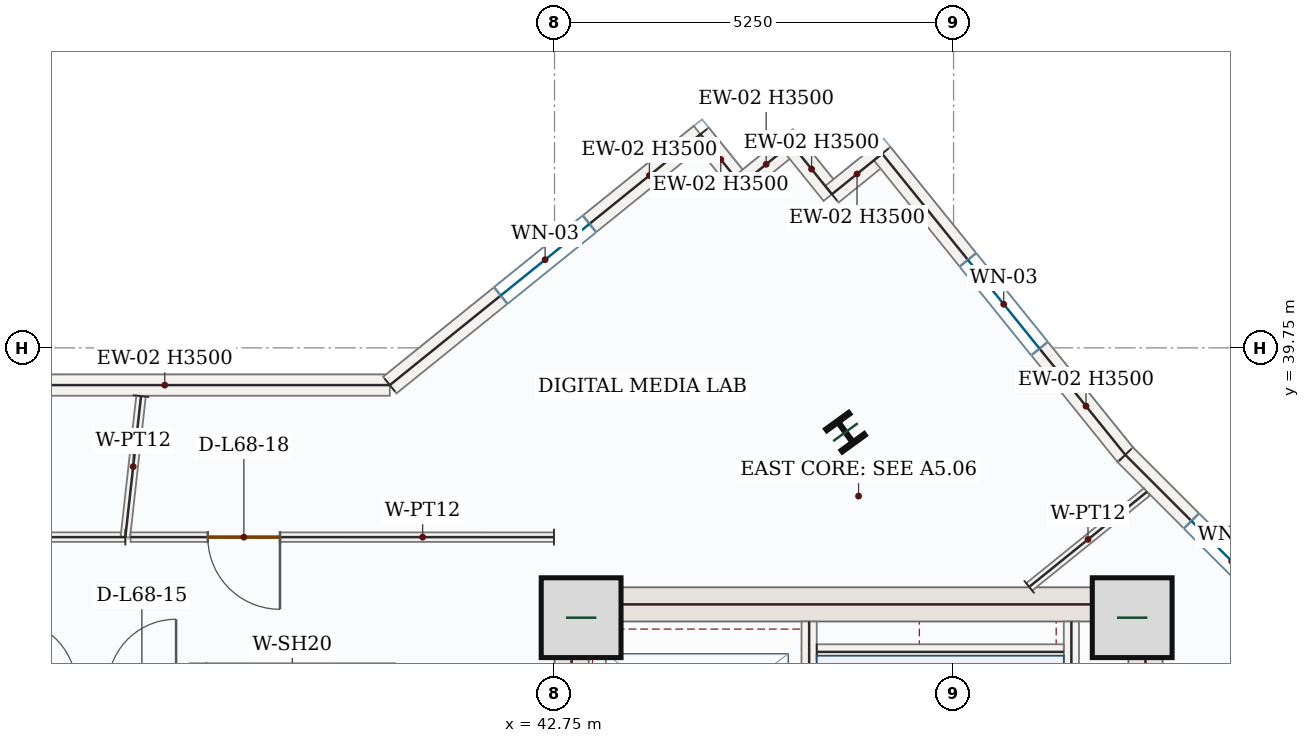
"""IFC4 building model, lengths in metres.
Left out: names, types, materials, properties, quantities, classifications, styles, units other than length and angle.
Written with IfcOpenShell. Run it as: python <this file> out.ifc"""

import sys

from ifc_helpers import new_model, si_unit, direction, frame, frame_2d, origin, origin_2d, place, context, subcontext, project, spatial, rectangle, i_section, extrude, source, transform, mapped, element, fill, save


model = new_model("IFC4")
c1 = context("Model", 3, precision=1e-05, world=origin(), true_north=direction((0.0, 1.0)))
c2 = subcontext(c1, "Body", "Model", "MODEL_VIEW")
j1 = project(units=[si_unit("LENGTHUNIT", "METRE"), si_unit("PLANEANGLEUNIT", "RADIAN")], contexts=[c1])
p1 = place(None, origin())
s1 = spatial("IfcSite", under=j1, at=p1, CompositionType="ELEMENT")
p2 = place(p1, origin())
s2 = spatial("IfcBuilding", under=s1, at=p2, CompositionType="ELEMENT")
p3 = place(p2, frame((0.0, 0.0, 284.1)))
s3 = spatial("IfcBuildingStorey", under=s2, at=p3, CompositionType="ELEMENT", Elevation=284.1)
p4 = place(p3, frame((42.975, 28.05, 0.0), z_axis=(0.0, 0.0, 1.0), x_axis=(0.0, 1.0, 0.0)))
e1 = element("IfcWall", 1, at=p4, inside=s3, PredefinedType="SHEAR", context=c2, shape_type="SweptSolid", body=[
    extrude(rectangle(XDim=8.55, YDim=0.45, at=frame_2d((4.275, 0.0))), origin(), (0.0, 0.0, 1.0), 3.5),
])
p5 = place(p4, frame((1.5, 0.0, 0.0)))
e2 = element("IfcOpeningElement", 2, at=p5, cuts=e1, PredefinedType="OPENING", context=c2, shape_type="SweptSolid", body=[
    extrude(rectangle(XDim=1.1, YDim=2.2, at=frame_2d((0.55, 1.1))), frame((0.0, 0.235, 0.0), z_axis=(0.0, -1.0, 0.0), x_axis=(1.0, 0.0, 0.0)), (0.0, 0.0, 1.0), 0.47),
])
m1 = source(origin(), c2, "Body", "SweptSolid", [
    extrude(rectangle(XDim=8.55, YDim=0.45, at=frame_2d((4.275, 0.0))), origin(), (0.0, 0.0, 1.0), 3.5),
])
p6 = place(p3, frame((50.525, 28.05, 0.0), z_axis=(0.0, 0.0, 1.0), x_axis=(0.0, 1.0, 0.0)))
e3 = element("IfcWall", 3, at=p6, inside=s3, PredefinedType="SHEAR", context=c2, shape_type="MappedRepresentation", body=[
    mapped(m1, transform((0.0, 0.0, 0.0), x_axis=(1.0, 0.0, 0.0), y_axis=(0.0, 1.0, 0.0), z_axis=(0.0, 0.0, 1.0), scale=1.0)),
])
m2 = source(origin(), c2, "Body", "SweptSolid", [
    extrude(rectangle(XDim=7.1, YDim=0.45, at=frame_2d((3.55, 0.0))), origin(), (0.0, 0.0, 1.0), 3.5),
])
p7 = place(p3, frame((43.2, 36.375, 0.0), z_axis=(0.0, 0.0, 1.0), x_axis=(1.0, 0.0, 0.0)))
e4 = element("IfcWall", 4, at=p7, inside=s3, PredefinedType="SHEAR", context=c2, shape_type="MappedRepresentation", body=[
    mapped(m2, transform((0.0, 0.0, 0.0), x_axis=(1.0, 0.0, 0.0), y_axis=(0.0, 1.0, 0.0), z_axis=(0.0, 0.0, 1.0), scale=1.0)),
])
m3 = source(origin(), c2, "Body", "SweptSolid", [
    extrude(rectangle(XDim=1.05, YDim=1.05, at=origin_2d()), origin(), (0.0, 0.0, 1.0), 3.75),
])
for number, where, z_axis, x_axis in (
    (5, (43.1, 36.2, 0.0), (0.0, 0.0, 1.0), (1.0, 0.0, 0.0)),
    (6, (50.35, 36.2, 0.0), (0.0, 0.0, 1.0), (1.0, 0.0, 0.0)),
):
    element("IfcColumn", number, at=place(p3, frame(where, z_axis=z_axis, x_axis=x_axis)), inside=s3, PredefinedType="COLUMN", context=c2, shape_type="MappedRepresentation", body=[
        mapped(m3, transform((0.0, 0.0, 0.0), x_axis=(1.0, 0.0, 0.0), y_axis=(0.0, 1.0, 0.0), z_axis=(0.0, 0.0, 1.0), scale=1.0)),
    ])
m4 = source(origin(), c2, "Body", "SweptSolid", [
    extrude(i_section(OverallWidth=0.374, OverallDepth=0.372, WebThickness=0.016, FlangeThickness=0.026, FilletRadius=0.018, at=origin_2d()), origin(), (0.0, 0.0, 1.0), 3.75),
])
p8 = place(p3, frame((46.578, 38.641, 0.0), z_axis=(0.0, 0.0, 1.0), x_axis=(0.809016994375, 0.587785252292, 0.0)))
e7 = element("IfcColumn", 7, at=p8, inside=s3, PredefinedType="COLUMN", context=c2, shape_type="MappedRepresentation", body=[
    mapped(m4, transform((0.0, 0.0, 0.0), x_axis=(1.0, 0.0, 0.0), y_axis=(0.0, 1.0, 0.0), z_axis=(0.0, 0.0, 1.0), scale=1.0)),
])
m5 = source(origin(), c2, "Body", "SweptSolid", [
    extrude(rectangle(XDim=5.922, YDim=0.28, at=frame_2d((2.961, 0.0))), origin(), (0.0, 0.0, 1.0), 3.5),
])
p9 = place(p3, frame((34.661, 39.26, 0.0), z_axis=(0.0, 0.0, 1.0), x_axis=(1.0, 0.0, 0.0)))
e8 = element("IfcWall", 8, at=p9, inside=s3, PredefinedType="SOLIDWALL", context=c2, shape_type="MappedRepresentation", body=[
    mapped(m5, transform((0.0, 0.0, 0.0), x_axis=(1.0, 0.0, 0.0), y_axis=(0.0, 1.0, 0.0), z_axis=(0.0, 0.0, 1.0), scale=1.0)),
])
p10 = place(p3, frame((40.583, 39.26, 0.0), z_axis=(0.0, 0.0, 1.0), x_axis=(0.778072238875, 0.628174809342, 0.0)))
e9 = element("IfcWall", 9, at=p10, inside=s3, PredefinedType="SOLIDWALL", context=c2, shape_type="SweptSolid", body=[
    extrude(rectangle(XDim=5.253, YDim=0.28, at=frame_2d((2.626, 0.0))), origin(), (0.0, 0.0, 1.0), 3.5),
])
p11 = place(p10, frame((1.876, 0.0, 0.85)))
e10 = element("IfcOpeningElement", 10, at=p11, cuts=e9, PredefinedType="OPENING", context=c2, shape_type="SweptSolid", body=[
    extrude(rectangle(XDim=1.5, YDim=1.5, at=frame_2d((0.75, 0.75))), frame((0.0, 0.15, 0.0), z_axis=(0.0, -1.0, 0.0), x_axis=(1.0, 0.0, 0.0)), (0.0, 0.0, 1.0), 0.3),
])
m6 = source(origin(), c2, "Body", "SweptSolid", [
    extrude(rectangle(XDim=0.85, YDim=0.28, at=frame_2d((0.425, 0.0))), origin(), (0.0, 0.0, 1.0), 3.5),
])
p12 = place(p3, frame((44.67, 42.56, 0.0), z_axis=(0.0, 0.0, 1.0), x_axis=(0.628156579423, -0.778086956405, 0.0)))
e11 = element("IfcWall", 11, at=p12, inside=s3, PredefinedType="SOLIDWALL", context=c2, shape_type="MappedRepresentation", body=[
    mapped(m6, transform((0.0, 0.0, 0.0), x_axis=(1.0, 0.0, 0.0), y_axis=(0.0, 1.0, 0.0), z_axis=(0.0, 0.0, 1.0), scale=1.0)),
])
m7 = source(origin(), c2, "Body", "SweptSolid", [
    extrude(rectangle(XDim=0.85, YDim=0.28, at=frame_2d((0.425, 0.0))), origin(), (0.0, 0.0, 1.0), 3.5),
])
p13 = place(p3, frame((45.204, 41.898, 0.0), z_axis=(0.0, 0.0, 1.0), x_axis=(0.777973585776, 0.628296983786, 0.0)))
e12 = element("IfcWall", 12, at=p13, inside=s3, PredefinedType="SOLIDWALL", context=c2, shape_type="MappedRepresentation", body=[
    mapped(m7, transform((0.0, 0.0, 0.0), x_axis=(1.0, 0.0, 0.0), y_axis=(0.0, 1.0, 0.0), z_axis=(0.0, 0.0, 1.0), scale=1.0)),
])
p14 = place(p3, frame((45.865, 42.432, 0.0), z_axis=(0.0, 0.0, 1.0), x_axis=(0.628330422687, -0.777946579095, 0.0)))
e13 = element("IfcWall", 13, at=p14, inside=s3, PredefinedType="SOLIDWALL", context=c2, shape_type="MappedRepresentation", body=[
    mapped(m6, transform((0.0, 0.0, 0.0), x_axis=(1.0, 0.0, 0.0), y_axis=(0.0, 1.0, 0.0), z_axis=(0.0, 0.0, 1.0), scale=1.0)),
])
p15 = place(p3, frame((46.399, 41.771, 0.0), z_axis=(0.0, 0.0, 1.0), x_axis=(0.777973585776, 0.628296983786, 0.0)))
e14 = element("IfcWall", 14, at=p15, inside=s3, PredefinedType="SOLIDWALL", context=c2, shape_type="MappedRepresentation", body=[
    mapped(m7, transform((0.0, 0.0, 0.0), x_axis=(1.0, 0.0, 0.0), y_axis=(0.0, 1.0, 0.0), z_axis=(0.0, 0.0, 1.0), scale=1.0)),
])
p16 = place(p3, frame((47.06, 42.305, 0.0), z_axis=(0.0, 0.0, 1.0), x_axis=(0.628225517447, -0.778031297075, 0.0)))
e15 = element("IfcWall", 15, at=p16, inside=s3, PredefinedType="SOLIDWALL", context=c2, shape_type="SweptSolid", body=[
    extrude(rectangle(XDim=5.093, YDim=0.28, at=frame_2d((2.546, 0.0))), origin(), (0.0, 0.0, 1.0), 3.5),
])
p17 = place(p16, frame((1.796, 0.0, 0.85)))
e16 = element("IfcOpeningElement", 16, at=p17, cuts=e15, PredefinedType="OPENING", context=c2, shape_type="SweptSolid", body=[
    extrude(rectangle(XDim=1.5, YDim=1.5, at=frame_2d((0.75, 0.75))), frame((0.0, 0.15, 0.0), z_axis=(0.0, -1.0, 0.0), x_axis=(1.0, 0.0, 0.0)), (0.0, 0.0, 1.0), 0.3),
])
p18 = place(p3, frame((50.26, 38.342, 0.0), z_axis=(0.0, 0.0, 1.0), x_axis=(0.707106781187, -0.707106781187, 0.0)))
e17 = element("IfcWall", 17, at=p18, inside=s3, PredefinedType="SOLIDWALL", context=c2, shape_type="SweptSolid", body=[
    extrude(rectangle(XDim=3.96, YDim=0.28, at=frame_2d((1.98, 0.0))), origin(), (0.0, 0.0, 1.0), 3.5),
])
p19 = place(p18, frame((1.23, 0.0, 0.85)))
e18 = element("IfcOpeningElement", 18, at=p19, cuts=e17, PredefinedType="OPENING", context=c2, shape_type="SweptSolid", body=[
    extrude(rectangle(XDim=1.5, YDim=1.5, at=frame_2d((0.75, 0.75))), frame((0.0, 0.15, 0.0), z_axis=(0.0, -1.0, 0.0), x_axis=(1.0, 0.0, 0.0)), (0.0, 0.0, 1.0), 0.3),
])
m8 = source(origin(), c2, "Body", "SweptSolid", [
    extrude(rectangle(XDim=7.87, YDim=0.2, at=frame_2d((3.935, 0.0))), origin(), (0.0, 0.0, 1.0), 3.5),
])
p20 = place(p3, frame((49.55, 28.28, 0.0), z_axis=(0.0, 0.0, 1.0), x_axis=(0.0, 1.0, 0.0)))
e19 = element("IfcWall", 19, at=p20, inside=s3, PredefinedType="SOLIDWALL", context=c2, shape_type="MappedRepresentation", body=[
    mapped(m8, transform((0.0, 0.0, 0.0), x_axis=(1.0, 0.0, 0.0), y_axis=(0.0, 1.0, 0.0), z_axis=(0.0, 0.0, 1.0), scale=1.0)),
])
p21 = place(p3, frame((46.1, 28.15, 0.0), z_axis=(0.0, 0.0, 1.0), x_axis=(0.0, 1.0, 0.0)))
e20 = element("IfcWall", 20, at=p21, inside=s3, PredefinedType="SOLIDWALL", context=c2, shape_type="SweptSolid", body=[
    extrude(rectangle(XDim=8.0, YDim=0.2, at=frame_2d((4.0, 0.0))), origin(), (0.0, 0.0, 1.0), 3.5),
])
p22 = place(p21, frame((0.4, 0.0, 0.0)))
e21 = element("IfcOpeningElement", 21, at=p22, cuts=e20, PredefinedType="OPENING", context=c2, shape_type="SweptSolid", body=[
    extrude(rectangle(XDim=1.05, YDim=2.15, at=frame_2d((0.525, 1.075))), frame((0.0, 0.11, 0.0), z_axis=(0.0, -1.0, 0.0), x_axis=(1.0, 0.0, 0.0)), (0.0, 0.0, 1.0), 0.22),
])
m9 = source(origin(), c2, "Body", "SweptSolid", [
    extrude(rectangle(XDim=3.25, YDim=0.2, at=frame_2d((1.625, 0.0))), origin(), (0.0, 0.0, 1.0), 3.5),
])
p23 = place(p3, frame((46.2, 35.75, 0.0), z_axis=(0.0, 0.0, 1.0), x_axis=(1.0, 0.0, 0.0)))
e22 = element("IfcWall", 22, at=p23, inside=s3, PredefinedType="SOLIDWALL", context=c2, shape_type="MappedRepresentation", body=[
    mapped(m9, transform((0.0, 0.0, 0.0), x_axis=(1.0, 0.0, 0.0), y_axis=(0.0, 1.0, 0.0), z_axis=(0.0, 0.0, 1.0), scale=1.0)),
])
m10 = source(origin(), c2, "Body", "SweptSolid", [
    extrude(rectangle(XDim=2.4, YDim=0.2, at=frame_2d((1.2, 0.0))), origin(), (0.0, 0.0, 1.0), 3.5),
])
p24 = place(p3, frame((38.05, 33.2, 0.0), z_axis=(0.0, 0.0, 1.0), x_axis=(0.0, 1.0, 0.0)))
e23 = element("IfcWall", 23, at=p24, inside=s3, PredefinedType="SOLIDWALL", context=c2, shape_type="MappedRepresentation", body=[
    mapped(m10, transform((0.0, 0.0, 0.0), x_axis=(1.0, 0.0, 0.0), y_axis=(0.0, 1.0, 0.0), z_axis=(0.0, 0.0, 1.0), scale=1.0)),
])
p25 = place(p3, frame((40.55, 33.2, 0.0), z_axis=(0.0, 0.0, 1.0), x_axis=(0.0, 1.0, 0.0)))
e24 = element("IfcWall", 24, at=p25, inside=s3, PredefinedType="SOLIDWALL", context=c2, shape_type="SweptSolid", body=[
    extrude(rectangle(XDim=2.4, YDim=0.2, at=frame_2d((1.2, 0.0))), origin(), (0.0, 0.0, 1.0), 3.5),
])
p26 = place(p25, frame((0.65, 0.0, 0.0)))
e25 = element("IfcOpeningElement", 25, at=p26, cuts=e24, PredefinedType="OPENING", context=c2, shape_type="SweptSolid", body=[
    extrude(rectangle(XDim=1.1, YDim=2.15, at=frame_2d((0.55, 1.075))), frame((0.0, 0.11, 0.0), z_axis=(0.0, -1.0, 0.0), x_axis=(1.0, 0.0, 0.0)), (0.0, 0.0, 1.0), 0.22),
])
m11 = source(origin(), c2, "Body", "SweptSolid", [
    extrude(rectangle(XDim=1.989, YDim=0.125, at=frame_2d((0.995, 0.0))), origin(), (0.0, 0.0, 1.0), 3.5),
])
p27 = place(p3, frame((48.995, 36.605, 0.0), z_axis=(0.0, 0.0, 1.0), x_axis=(0.778058853423, 0.628191388519, 0.0)))
e26 = element("IfcWall", 26, at=p27, inside=s3, PredefinedType="PARTITIONING", context=c2, shape_type="MappedRepresentation", body=[
    mapped(m11, transform((0.0, 0.0, 0.0), x_axis=(1.0, 0.0, 0.0), y_axis=(0.0, 1.0, 0.0), z_axis=(0.0, 0.0, 1.0), scale=1.0)),
])
p28 = place(p3, frame((37.104, 37.26, 0.0), z_axis=(0.0, 0.0, 1.0), x_axis=(-1.0, 0.0, 0.0)))
e27 = element("IfcWall", 27, at=p28, inside=s3, PredefinedType="PARTITIONING", context=c2, shape_type="SweptSolid", body=[
    extrude(rectangle(XDim=6.727, YDim=0.125, at=frame_2d((3.364, 0.0))), origin(), (0.0, 0.0, 1.0), 3.5),
])
p29 = place(p28, frame((1.271, 0.0, 0.0)))
e28 = element("IfcOpeningElement", 28, at=p29, cuts=e27, PredefinedType="OPENING", context=c2, shape_type="SweptSolid", body=[
    extrude(rectangle(XDim=0.95, YDim=2.15, at=frame_2d((0.475, 1.075))), frame((0.0, 0.073, 0.0), z_axis=(0.0, -1.0, 0.0), x_axis=(1.0, 0.0, 0.0)), (0.0, 0.0, 1.0), 0.145),
])
m12 = source(origin(), c2, "Body", "SweptSolid", [
    extrude(rectangle(XDim=1.866, YDim=0.125, at=frame_2d((0.933, 0.0))), origin(), (0.0, 0.0, 1.0), 3.5),
])
p30 = place(p3, frame((37.31, 39.115, 0.0), z_axis=(0.0, 0.0, 1.0), x_axis=(-0.110661229882, -0.993858185156, 0.0)))
e29 = element("IfcWall", 29, at=p30, inside=s3, PredefinedType="PARTITIONING", context=c2, shape_type="MappedRepresentation", body=[
    mapped(m12, transform((0.0, 0.0, 0.0), x_axis=(1.0, 0.0, 0.0), y_axis=(0.0, 1.0, 0.0), z_axis=(0.0, 0.0, 1.0), scale=1.0)),
])
p31 = place(p3, frame((42.742, 37.26, 0.0), z_axis=(0.0, 0.0, 1.0), x_axis=(-0.99999999904, 4.382505e-05, 0.0)))
e30 = element("IfcWall", 30, at=p31, inside=s3, PredefinedType="PARTITIONING", context=c2, shape_type="SweptSolid", body=[
    extrude(rectangle(XDim=5.571, YDim=0.125, at=frame_2d((2.785, 0.0))), origin(), (0.0, 0.0, 1.0), 3.5),
])
p32 = place(p31, frame((3.604, 0.0, 0.0)))
e31 = element("IfcOpeningElement", 31, at=p32, cuts=e30, PredefinedType="OPENING", context=c2, shape_type="SweptSolid", body=[
    extrude(rectangle(XDim=0.95, YDim=2.15, at=frame_2d((0.475, 1.075))), frame((0.0, 0.073, 0.0), z_axis=(0.0, -1.0, 0.0), x_axis=(1.0, 0.0, 0.0)), (0.0, 0.0, 1.0), 0.145),
])
m13 = source(origin(), c2, "Body", "SweptSolid", [
    extrude(rectangle(XDim=1.5, YDim=1.5, at=frame_2d((0.75, 0.75))), frame((0.0, 0.03, 0.0), z_axis=(0.0, -1.0, 0.0), x_axis=(1.0, 0.0, 0.0)), (0.0, 0.0, 1.0), 0.06),
])
p33 = place(p11, origin())
e32 = element("IfcWindow", 32, at=p33, inside=s3, PartitioningType="SINGLE_PANEL", PredefinedType="WINDOW", context=c2, shape_type="MappedRepresentation", body=[
    mapped(m13, transform((0.0, 0.0, 0.0), x_axis=(1.0, 0.0, 0.0), y_axis=(0.0, 1.0, 0.0), z_axis=(0.0, 0.0, 1.0), scale=1.0)),
])
fill(e10, e32)
p34 = place(p17, origin())
e33 = element("IfcWindow", 33, at=p34, inside=s3, PartitioningType="SINGLE_PANEL", PredefinedType="WINDOW", context=c2, shape_type="MappedRepresentation", body=[
    mapped(m13, transform((0.0, 0.0, 0.0), x_axis=(1.0, 0.0, 0.0), y_axis=(0.0, 1.0, 0.0), z_axis=(0.0, 0.0, 1.0), scale=1.0)),
])
fill(e16, e33)
p35 = place(p19, origin())
e34 = element("IfcWindow", 34, at=p35, inside=s3, PartitioningType="SINGLE_PANEL", PredefinedType="WINDOW", context=c2, shape_type="MappedRepresentation", body=[
    mapped(m13, transform((0.0, 0.0, 0.0), x_axis=(1.0, 0.0, 0.0), y_axis=(0.0, 1.0, 0.0), z_axis=(0.0, 0.0, 1.0), scale=1.0)),
])
fill(e18, e34)
m14 = source(origin(), c2, "Body", "SweptSolid", [
    extrude(rectangle(XDim=0.95, YDim=2.15, at=frame_2d((0.475, 1.075))), frame((0.0, 0.025, 0.0), z_axis=(0.0, -1.0, 0.0), x_axis=(1.0, 0.0, 0.0)), (0.0, 0.0, 1.0), 0.05),
])
p36 = place(p32, origin())
e35 = element("IfcDoor", 35, at=p36, inside=s3, OperationType="SINGLE_SWING_LEFT", PredefinedType="DOOR", context=c2, shape_type="MappedRepresentation", body=[
    mapped(m14, transform((0.0, 0.0, 0.0), x_axis=(1.0, 0.0, 0.0), y_axis=(0.0, 1.0, 0.0), z_axis=(0.0, 0.0, 1.0), scale=1.0)),
])
fill(e31, e35)
save(model, sys.argv[1])
